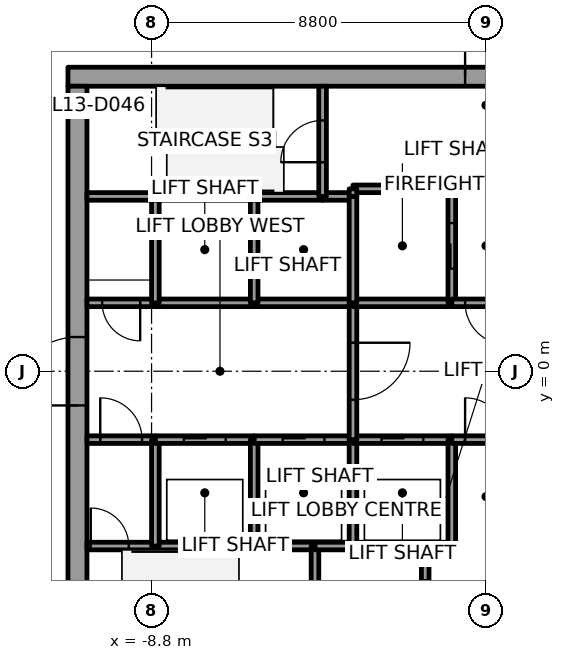
"""IFC4 building model, lengths in metres.
Left out: names, types, materials, properties, quantities, classifications, styles, units other than length and angle.
Written with IfcOpenShell. Run it as: python <this file> out.ifc"""

import sys

from ifc_helpers import new_model, si_unit, direction, frame, frame_2d, origin, place, context, subcontext, project, spatial, rectangle, extrude, element, fill, save


model = new_model("IFC4")
c1 = context("Model", 3, precision=1e-05, world=origin(), true_north=direction((0.0, 1.0)))
c2 = subcontext(c1, "Body", "Model", "MODEL_VIEW")
j1 = project(units=[si_unit("LENGTHUNIT", "METRE"), si_unit("PLANEANGLEUNIT", "RADIAN")], contexts=[c1])
p1 = place(None, origin())
s1 = spatial("IfcSite", under=j1, at=p1, CompositionType="ELEMENT")
p2 = place(p1, origin())
s2 = spatial("IfcBuilding", under=s1, at=p2, CompositionType="ELEMENT")
p3 = place(p2, frame((0.0, 0.0, 70.2)))
s3 = spatial("IfcBuildingStorey", under=s2, at=p3, CompositionType="ELEMENT", Elevation=70.2)
p4 = place(p3, frame((-11.0, 7.75, 0.0), z_axis=(0.0, 0.0, 1.0), x_axis=(1.0, 0.0, 0.0)))
e1 = element("IfcWall", 1, at=p4, inside=s3, PredefinedType="SHEAR", context=c2, shape_type="SweptSolid", body=[
    extrude(rectangle(XDim=22.0, YDim=0.5, at=frame_2d((11.0, 0.0))), origin(), (0.0, 0.0, 1.0), 3.7),
])
p5 = place(p4, frame((10.45, 0.0, 0.0)))
e2 = element("IfcOpeningElement", 2, at=p5, cuts=e1, PredefinedType="OPENING", context=c2, shape_type="SweptSolid", body=[
    extrude(rectangle(XDim=1.1, YDim=2.1, at=frame_2d((0.55, 1.05))), frame((0.0, 0.25, 0.0), z_axis=(0.0, -1.0, 0.0), x_axis=(1.0, 0.0, 0.0)), (0.0, 0.0, 1.0), 0.5),
])
p6 = place(p3, frame((-10.75, -7.5, 0.0), z_axis=(0.0, 0.0, 1.0), x_axis=(0.0, 1.0, 0.0)))
e3 = element("IfcWall", 3, at=p6, inside=s3, PredefinedType="SHEAR", context=c2, shape_type="SweptSolid", body=[
    extrude(rectangle(XDim=15.0, YDim=0.5, at=frame_2d((7.5, 0.0))), origin(), (0.0, 0.0, 1.0), 3.7),
])
p7 = place(p6, frame((6.6, 0.0, 0.0)))
e4 = element("IfcOpeningElement", 4, at=p7, cuts=e3, PredefinedType="OPENING", context=c2, shape_type="SweptSolid", body=[
    extrude(rectangle(XDim=1.8, YDim=2.1, at=frame_2d((0.9, 1.05))), frame((0.0, 0.25, 0.0), z_axis=(0.0, -1.0, 0.0), x_axis=(1.0, 0.0, 0.0)), (0.0, 0.0, 1.0), 0.5),
])
p8 = place(p3, frame((-10.5, -4.6, 0.0), z_axis=(0.0, 0.0, 1.0), x_axis=(1.0, 0.0, 0.0)))
e5 = element("IfcWall", 5, at=p8, inside=s3, PredefinedType="SOLIDWALL", context=c2, shape_type="SweptSolid", body=[
    extrude(rectangle(XDim=1.8, YDim=0.2, at=frame_2d((0.9, 0.0))), origin(), (0.0, 0.0, 1.0), 3.55),
])
p9 = place(p8, frame((0.1, 0.0, 0.0)))
e6 = element("IfcOpeningElement", 6, at=p9, cuts=e5, PredefinedType="OPENING", context=c2, shape_type="SweptSolid", body=[
    extrude(rectangle(XDim=1.0, YDim=2.1, at=frame_2d((0.5, 1.05))), frame((0.0, 0.1, 0.0), z_axis=(0.0, -1.0, 0.0), x_axis=(1.0, 0.0, 0.0)), (0.0, 0.0, 1.0), 0.2),
])
p10 = place(p3, frame((-10.5, -1.8, 0.0), z_axis=(0.0, 0.0, 1.0), x_axis=(1.0, 0.0, 0.0)))
e7 = element("IfcWall", 7, at=p10, inside=s3, PredefinedType="SOLIDWALL", context=c2, shape_type="SweptSolid", body=[
    extrude(rectangle(XDim=1.8, YDim=0.2, at=frame_2d((0.9, 0.0))), origin(), (0.0, 0.0, 1.0), 3.55),
])
p11 = place(p10, frame((0.35, 0.0, 0.0)))
e8 = element("IfcOpeningElement", 8, at=p11, cuts=e7, PredefinedType="OPENING", context=c2, shape_type="SweptSolid", body=[
    extrude(rectangle(XDim=1.1, YDim=2.1, at=frame_2d((0.55, 1.05))), frame((0.0, 0.1, 0.0), z_axis=(0.0, -1.0, 0.0), x_axis=(1.0, 0.0, 0.0)), (0.0, 0.0, 1.0), 0.2),
])
p12 = place(p3, frame((-8.7, 1.8, 0.0), z_axis=(0.0, 0.0, 1.0), x_axis=(-1.0, 0.0, 0.0)))
e9 = element("IfcWall", 9, at=p12, inside=s3, PredefinedType="SOLIDWALL", context=c2, shape_type="SweptSolid", body=[
    extrude(rectangle(XDim=1.8, YDim=0.2, at=frame_2d((0.9, 0.0))), origin(), (0.0, 0.0, 1.0), 3.55),
])
p13 = place(p12, frame((0.4, 0.0, 0.0)))
e10 = element("IfcOpeningElement", 10, at=p13, cuts=e9, PredefinedType="OPENING", context=c2, shape_type="SweptSolid", body=[
    extrude(rectangle(XDim=1.0, YDim=2.1, at=frame_2d((0.5, 1.05))), frame((0.0, 0.1, 0.0), z_axis=(0.0, -1.0, 0.0), x_axis=(1.0, 0.0, 0.0)), (0.0, 0.0, 1.0), 0.2),
])
p14 = place(p3, frame((-8.7, 4.6, 0.0), z_axis=(0.0, 0.0, 1.0), x_axis=(-1.0, 0.0, 0.0)))
e11 = element("IfcWall", 11, at=p14, inside=s3, PredefinedType="SOLIDWALL", context=c2, shape_type="SweptSolid", body=[
    extrude(rectangle(XDim=1.8, YDim=0.2, at=frame_2d((0.9, 0.0))), origin(), (0.0, 0.0, 1.0), 3.55),
])
p15 = place(p3, frame((-8.7, -4.6, 0.0), z_axis=(0.0, 0.0, 1.0), x_axis=(1.0, 0.0, 0.0)))
e12 = element("IfcWall", 12, at=p15, inside=s3, PredefinedType="SOLIDWALL", context=c2, shape_type="SweptSolid", body=[
    extrude(rectangle(XDim=2.6, YDim=0.2, at=frame_2d((1.3, 0.0))), origin(), (0.0, 0.0, 1.0), 3.55),
])
p16 = place(p3, frame((-8.7, -4.6, 0.0), z_axis=(0.0, 0.0, 1.0), x_axis=(0.0, 1.0, 0.0)))
e13 = element("IfcWall", 13, at=p16, inside=s3, PredefinedType="SOLIDWALL", context=c2, shape_type="SweptSolid", body=[
    extrude(rectangle(XDim=2.8, YDim=0.2, at=frame_2d((1.4, 0.0))), origin(), (0.0, 0.0, 1.0), 3.55),
])
p17 = place(p3, frame((-8.7, -1.8, 0.0), z_axis=(0.0, 0.0, 1.0), x_axis=(1.0, 0.0, 0.0)))
e14 = element("IfcWall", 14, at=p17, inside=s3, PredefinedType="SOLIDWALL", context=c2, shape_type="SweptSolid", body=[
    extrude(rectangle(XDim=2.6, YDim=0.2, at=frame_2d((1.3, 0.0))), origin(), (0.0, 0.0, 1.0), 3.55),
])
p18 = place(p17, frame((0.75, 0.0, 0.0)))
e15 = element("IfcOpeningElement", 15, at=p18, cuts=e14, PredefinedType="OPENING", context=c2, shape_type="SweptSolid", body=[
    extrude(rectangle(XDim=1.1, YDim=2.1, at=frame_2d((0.55, 1.05))), frame((0.0, 0.1, 0.0), z_axis=(0.0, -1.0, 0.0), x_axis=(1.0, 0.0, 0.0)), (0.0, 0.0, 1.0), 0.2),
])
p19 = place(p3, frame((-6.1, 1.8, 0.0), z_axis=(0.0, 0.0, 1.0), x_axis=(-1.0, 0.0, 0.0)))
e16 = element("IfcWall", 16, at=p19, inside=s3, PredefinedType="SOLIDWALL", context=c2, shape_type="SweptSolid", body=[
    extrude(rectangle(XDim=2.6, YDim=0.2, at=frame_2d((1.3, 0.0))), origin(), (0.0, 0.0, 1.0), 3.55),
])
p20 = place(p3, frame((-8.7, 1.8, 0.0), z_axis=(0.0, 0.0, 1.0), x_axis=(0.0, 1.0, 0.0)))
e17 = element("IfcWall", 17, at=p20, inside=s3, PredefinedType="SOLIDWALL", context=c2, shape_type="SweptSolid", body=[
    extrude(rectangle(XDim=2.8, YDim=0.2, at=frame_2d((1.4, 0.0))), origin(), (0.0, 0.0, 1.0), 3.55),
])
p21 = place(p3, frame((-6.1, 4.6, 0.0), z_axis=(0.0, 0.0, 1.0), x_axis=(-1.0, 0.0, 0.0)))
e18 = element("IfcWall", 18, at=p21, inside=s3, PredefinedType="SOLIDWALL", context=c2, shape_type="SweptSolid", body=[
    extrude(rectangle(XDim=2.6, YDim=0.2, at=frame_2d((1.3, 0.0))), origin(), (0.0, 0.0, 1.0), 3.55),
])
p22 = place(p3, frame((-6.1, -4.6, 0.0), z_axis=(0.0, 0.0, 1.0), x_axis=(1.0, 0.0, 0.0)))
e19 = element("IfcWall", 19, at=p22, inside=s3, PredefinedType="SOLIDWALL", context=c2, shape_type="SweptSolid", body=[
    extrude(rectangle(XDim=1.6, YDim=0.2, at=frame_2d((0.8, 0.0))), origin(), (0.0, 0.0, 1.0), 3.55),
])
p23 = place(p3, frame((-6.1, -4.6, 0.0), z_axis=(0.0, 0.0, 1.0), x_axis=(0.0, 1.0, 0.0)))
e20 = element("IfcWall", 20, at=p23, inside=s3, PredefinedType="SOLIDWALL", context=c2, shape_type="SweptSolid", body=[
    extrude(rectangle(XDim=2.8, YDim=0.2, at=frame_2d((1.4, 0.0))), origin(), (0.0, 0.0, 1.0), 3.55),
])
p24 = place(p3, frame((-6.1, -1.8, 0.0), z_axis=(0.0, 0.0, 1.0), x_axis=(1.0, 0.0, 0.0)))
e21 = element("IfcWall", 21, at=p24, inside=s3, PredefinedType="SOLIDWALL", context=c2, shape_type="SweptSolid", body=[
    extrude(rectangle(XDim=2.6, YDim=0.2, at=frame_2d((1.3, 0.0))), origin(), (0.0, 0.0, 1.0), 3.55),
])
p25 = place(p24, frame((0.75, 0.0, 0.0)))
e22 = element("IfcOpeningElement", 22, at=p25, cuts=e21, PredefinedType="OPENING", context=c2, shape_type="SweptSolid", body=[
    extrude(rectangle(XDim=1.1, YDim=2.1, at=frame_2d((0.55, 1.05))), frame((0.0, 0.1, 0.0), z_axis=(0.0, -1.0, 0.0), x_axis=(1.0, 0.0, 0.0)), (0.0, 0.0, 1.0), 0.2),
])
p26 = place(p3, frame((-3.5, 1.8, 0.0), z_axis=(0.0, 0.0, 1.0), x_axis=(-1.0, 0.0, 0.0)))
e23 = element("IfcWall", 23, at=p26, inside=s3, PredefinedType="SOLIDWALL", context=c2, shape_type="SweptSolid", body=[
    extrude(rectangle(XDim=2.6, YDim=0.2, at=frame_2d((1.3, 0.0))), origin(), (0.0, 0.0, 1.0), 3.55),
])
p27 = place(p3, frame((-6.1, 1.8, 0.0), z_axis=(0.0, 0.0, 1.0), x_axis=(0.0, 1.0, 0.0)))
e24 = element("IfcWall", 24, at=p27, inside=s3, PredefinedType="SOLIDWALL", context=c2, shape_type="SweptSolid", body=[
    extrude(rectangle(XDim=2.8, YDim=0.2, at=frame_2d((1.4, 0.0))), origin(), (0.0, 0.0, 1.0), 3.55),
])
p28 = place(p3, frame((-4.3, 4.6, 0.0), z_axis=(0.0, 0.0, 1.0), x_axis=(-1.0, 0.0, 0.0)))
e25 = element("IfcWall", 25, at=p28, inside=s3, PredefinedType="SOLIDWALL", context=c2, shape_type="SweptSolid", body=[
    extrude(rectangle(XDim=1.8, YDim=0.2, at=frame_2d((0.9, 0.0))), origin(), (0.0, 0.0, 1.0), 3.55),
])
p29 = place(p3, frame((-4.5, -4.6, 0.0), z_axis=(0.0, 0.0, 1.0), x_axis=(0.0, -1.0, 0.0)))
e26 = element("IfcWall", 26, at=p29, inside=s3, PredefinedType="SOLIDWALL", context=c2, shape_type="SweptSolid", body=[
    extrude(rectangle(XDim=2.9, YDim=0.2, at=frame_2d((1.45, 0.0))), origin(), (0.0, 0.0, 1.0), 3.55),
])
p30 = place(p3, frame((-4.5, -4.6, 0.0), z_axis=(0.0, 0.0, 1.0), x_axis=(1.0, 0.0, 0.0)))
e27 = element("IfcWall", 27, at=p30, inside=s3, PredefinedType="SOLIDWALL", context=c2, shape_type="SweptSolid", body=[
    extrude(rectangle(XDim=1.0, YDim=0.2, at=frame_2d((0.5, 0.0))), origin(), (0.0, 0.0, 1.0), 3.55),
])
p31 = place(p3, frame((-3.5, 4.6, 0.0), z_axis=(0.0, 0.0, 1.0), x_axis=(-1.0, 0.0, 0.0)))
e28 = element("IfcWall", 28, at=p31, inside=s3, PredefinedType="SOLIDWALL", context=c2, shape_type="SweptSolid", body=[
    extrude(rectangle(XDim=0.8, YDim=0.2, at=frame_2d((0.4, 0.0))), origin(), (0.0, 0.0, 1.0), 3.55),
])
p32 = place(p3, frame((-4.3, 4.6, 0.0), z_axis=(0.0, 0.0, 1.0), x_axis=(0.0, 1.0, 0.0)))
e29 = element("IfcWall", 29, at=p32, inside=s3, PredefinedType="SOLIDWALL", context=c2, shape_type="SweptSolid", body=[
    extrude(rectangle(XDim=2.9, YDim=0.2, at=frame_2d((1.45, 0.0))), origin(), (0.0, 0.0, 1.0), 3.55),
])
p33 = place(p32, frame((0.9, 0.0, 0.0)))
e30 = element("IfcOpeningElement", 30, at=p33, cuts=e29, PredefinedType="OPENING", context=c2, shape_type="SweptSolid", body=[
    extrude(rectangle(XDim=1.1, YDim=2.1, at=frame_2d((0.55, 1.05))), frame((0.0, 0.1, 0.0), z_axis=(0.0, -1.0, 0.0), x_axis=(1.0, 0.0, 0.0)), (0.0, 0.0, 1.0), 0.2),
])
p34 = place(p3, frame((-3.5, -4.6, 0.0), z_axis=(0.0, 0.0, 1.0), x_axis=(1.0, 0.0, 0.0)))
e31 = element("IfcWall", 31, at=p34, inside=s3, PredefinedType="SOLIDWALL", context=c2, shape_type="SweptSolid", body=[
    extrude(rectangle(XDim=1.9, YDim=0.2, at=frame_2d((0.95, 0.0))), origin(), (0.0, 0.0, 1.0), 3.55),
])
p35 = place(p3, frame((-3.5, -4.6, 0.0), z_axis=(0.0, 0.0, 1.0), x_axis=(0.0, 1.0, 0.0)))
e32 = element("IfcWall", 32, at=p35, inside=s3, PredefinedType="SOLIDWALL", context=c2, shape_type="SweptSolid", body=[
    extrude(rectangle(XDim=2.8, YDim=0.2, at=frame_2d((1.4, 0.0))), origin(), (0.0, 0.0, 1.0), 3.55),
])
p36 = place(p3, frame((-3.5, -1.8, 0.0), z_axis=(0.0, 0.0, 1.0), x_axis=(1.0, 0.0, 0.0)))
e33 = element("IfcWall", 33, at=p36, inside=s3, PredefinedType="SOLIDWALL", context=c2, shape_type="SweptSolid", body=[
    extrude(rectangle(XDim=2.6, YDim=0.2, at=frame_2d((1.3, 0.0))), origin(), (0.0, 0.0, 1.0), 3.55),
])
p37 = place(p36, frame((0.75, 0.0, 0.0)))
e34 = element("IfcOpeningElement", 34, at=p37, cuts=e33, PredefinedType="OPENING", context=c2, shape_type="SweptSolid", body=[
    extrude(rectangle(XDim=1.1, YDim=2.1, at=frame_2d((0.55, 1.05))), frame((0.0, 0.1, 0.0), z_axis=(0.0, -1.0, 0.0), x_axis=(1.0, 0.0, 0.0)), (0.0, 0.0, 1.0), 0.2),
])
p38 = place(p3, frame((-3.5, 1.8, 0.0), z_axis=(0.0, 0.0, 1.0), x_axis=(0.0, -1.0, 0.0)))
e35 = element("IfcWall", 35, at=p38, inside=s3, PredefinedType="SOLIDWALL", context=c2, shape_type="SweptSolid", body=[
    extrude(rectangle(XDim=3.6, YDim=0.2, at=frame_2d((1.8, 0.0))), origin(), (0.0, 0.0, 1.0), 3.55),
])
p39 = place(p38, frame((1.05, 0.0, 0.0)))
e36 = element("IfcOpeningElement", 36, at=p39, cuts=e35, PredefinedType="OPENING", context=c2, shape_type="SweptSolid", body=[
    extrude(rectangle(XDim=1.5, YDim=2.1, at=frame_2d((0.75, 1.05))), frame((0.0, 0.1, 0.0), z_axis=(0.0, -1.0, 0.0), x_axis=(1.0, 0.0, 0.0)), (0.0, 0.0, 1.0), 0.2),
])
p40 = place(p3, frame((-0.9, 1.8, 0.0), z_axis=(0.0, 0.0, 1.0), x_axis=(-1.0, 0.0, 0.0)))
e37 = element("IfcWall", 37, at=p40, inside=s3, PredefinedType="SOLIDWALL", context=c2, shape_type="SweptSolid", body=[
    extrude(rectangle(XDim=2.6, YDim=0.2, at=frame_2d((1.3, 0.0))), origin(), (0.0, 0.0, 1.0), 3.55),
])
p41 = place(p3, frame((-3.5, 4.6, 0.0), z_axis=(0.0, 0.0, 1.0), x_axis=(0.0, -1.0, 0.0)))
e38 = element("IfcWall", 38, at=p41, inside=s3, PredefinedType="SOLIDWALL", context=c2, shape_type="SweptSolid", body=[
    extrude(rectangle(XDim=2.8, YDim=0.2, at=frame_2d((1.4, 0.0))), origin(), (0.0, 0.0, 1.0), 3.55),
])
p42 = place(p3, frame((-0.9, 1.8, 0.0), z_axis=(0.0, 0.0, 1.0), x_axis=(0.0, 1.0, 0.0)))
e39 = element("IfcWall", 39, at=p42, inside=s3, PredefinedType="SOLIDWALL", context=c2, shape_type="SweptSolid", body=[
    extrude(rectangle(XDim=3.0, YDim=0.2, at=frame_2d((1.5, 0.0))), origin(), (0.0, 0.0, 1.0), 3.55),
])
p43 = place(p42, frame((0.9, 0.0, 0.0)))
e40 = element("IfcOpeningElement", 40, at=p43, cuts=e39, PredefinedType="OPENING", context=c2, shape_type="SweptSolid", body=[
    extrude(rectangle(XDim=1.2, YDim=2.1, at=frame_2d((0.6, 1.05))), frame((0.0, 0.1, 0.0), z_axis=(0.0, -1.0, 0.0), x_axis=(1.0, 0.0, 0.0)), (0.0, 0.0, 1.0), 0.2),
])
p44 = place(p3, frame((-0.9, 4.8, 0.0), z_axis=(0.0, 0.0, 1.0), x_axis=(-1.0, 0.0, 0.0)))
e41 = element("IfcWall", 41, at=p44, inside=s3, PredefinedType="SOLIDWALL", context=c2, shape_type="SweptSolid", body=[
    extrude(rectangle(XDim=2.6, YDim=0.2, at=frame_2d((1.3, 0.0))), origin(), (0.0, 0.0, 1.0), 3.55),
])
p45 = place(p3, frame((-3.5, 4.8, 0.0), z_axis=(0.0, 0.0, 1.0), x_axis=(0.0, -1.0, 0.0)))
e42 = element("IfcWall", 42, at=p45, inside=s3, PredefinedType="SOLIDWALL", context=c2, shape_type="SweptSolid", body=[
    extrude(rectangle(XDim=0.2, YDim=0.2, at=frame_2d((0.1, 0.0))), origin(), (0.0, 0.0, 1.0), 3.55),
])
p46 = place(p3, frame((-1.6, -7.5, 0.0), z_axis=(0.0, 0.0, 1.0), x_axis=(0.0, 1.0, 0.0)))
e43 = element("IfcWall", 43, at=p46, inside=s3, PredefinedType="SOLIDWALL", context=c2, shape_type="SweptSolid", body=[
    extrude(rectangle(XDim=2.9, YDim=0.2, at=frame_2d((1.45, 0.0))), origin(), (0.0, 0.0, 1.0), 3.55),
])
p47 = place(p46, frame((0.9, 0.0, 0.0)))
e44 = element("IfcOpeningElement", 44, at=p47, cuts=e43, PredefinedType="OPENING", context=c2, shape_type="SweptSolid", body=[
    extrude(rectangle(XDim=1.1, YDim=2.1, at=frame_2d((0.55, 1.05))), frame((0.0, 0.1, 0.0), z_axis=(0.0, -1.0, 0.0), x_axis=(1.0, 0.0, 0.0)), (0.0, 0.0, 1.0), 0.2),
])
p48 = place(p3, frame((-1.6, -4.6, 0.0), z_axis=(0.0, 0.0, 1.0), x_axis=(1.0, 0.0, 0.0)))
e45 = element("IfcWall", 45, at=p48, inside=s3, PredefinedType="SOLIDWALL", context=c2, shape_type="SweptSolid", body=[
    extrude(rectangle(XDim=0.7, YDim=0.2, at=frame_2d((0.35, 0.0))), origin(), (0.0, 0.0, 1.0), 3.55),
])
p49 = place(p3, frame((-0.9, -4.6, 0.0), z_axis=(0.0, 0.0, 1.0), x_axis=(0.0, 1.0, 0.0)))
e46 = element("IfcWall", 46, at=p49, inside=s3, PredefinedType="SOLIDWALL", context=c2, shape_type="SweptSolid", body=[
    extrude(rectangle(XDim=2.8, YDim=0.2, at=frame_2d((1.4, 0.0))), origin(), (0.0, 0.0, 1.0), 3.55),
])
p50 = place(p3, frame((-0.9, -1.8, 0.0), z_axis=(0.0, 0.0, 1.0), x_axis=(1.0, 0.0, 0.0)))
e47 = element("IfcWall", 47, at=p50, inside=s3, PredefinedType="SOLIDWALL", context=c2, shape_type="SweptSolid", body=[
    extrude(rectangle(XDim=1.8, YDim=0.2, at=frame_2d((0.9, 0.0))), origin(), (0.0, 0.0, 1.0), 3.55),
])
p51 = place(p50, frame((0.35, 0.0, 0.0)))
e48 = element("IfcOpeningElement", 48, at=p51, cuts=e47, PredefinedType="OPENING", context=c2, shape_type="SweptSolid", body=[
    extrude(rectangle(XDim=1.1, YDim=2.1, at=frame_2d((0.55, 1.05))), frame((0.0, 0.1, 0.0), z_axis=(0.0, -1.0, 0.0), x_axis=(1.0, 0.0, 0.0)), (0.0, 0.0, 1.0), 0.2),
])
p52 = place(p3, frame((0.9, 1.8, 0.0), z_axis=(0.0, 0.0, 1.0), x_axis=(-1.0, 0.0, 0.0)))
e49 = element("IfcWall", 49, at=p52, inside=s3, PredefinedType="SOLIDWALL", context=c2, shape_type="SweptSolid", body=[
    extrude(rectangle(XDim=1.8, YDim=0.2, at=frame_2d((0.9, 0.0))), origin(), (0.0, 0.0, 1.0), 3.55),
])
p53 = place(p52, frame((0.35, 0.0, 0.0)))
e50 = element("IfcOpeningElement", 50, at=p53, cuts=e49, PredefinedType="OPENING", context=c2, shape_type="SweptSolid", body=[
    extrude(rectangle(XDim=1.1, YDim=2.1, at=frame_2d((0.55, 1.05))), frame((0.0, 0.1, 0.0), z_axis=(0.0, -1.0, 0.0), x_axis=(1.0, 0.0, 0.0)), (0.0, 0.0, 1.0), 0.2),
])
p54 = place(p18, origin())
e51 = element("IfcDoor", 51, at=p54, inside=s3, OperationType="SLIDING_TO_RIGHT", PredefinedType="DOOR", context=c2, shape_type="SweptSolid", body=[
    extrude(rectangle(XDim=1.1, YDim=2.1, at=frame_2d((0.55, 1.05))), frame((0.0, 0.025, 0.0), z_axis=(0.0, -1.0, 0.0), x_axis=(1.0, 0.0, 0.0)), (0.0, 0.0, 1.0), 0.05),
])
fill(e15, e51)
p55 = place(p25, origin())
e52 = element("IfcDoor", 52, at=p55, inside=s3, OperationType="SLIDING_TO_RIGHT", PredefinedType="DOOR", context=c2, shape_type="SweptSolid", body=[
    extrude(rectangle(XDim=1.1, YDim=2.1, at=frame_2d((0.55, 1.05))), frame((0.0, 0.025, 0.0), z_axis=(0.0, -1.0, 0.0), x_axis=(1.0, 0.0, 0.0)), (0.0, 0.0, 1.0), 0.05),
])
fill(e22, e52)
p56 = place(p37, origin())
e53 = element("IfcDoor", 53, at=p56, inside=s3, OperationType="SLIDING_TO_RIGHT", PredefinedType="DOOR", context=c2, shape_type="SweptSolid", body=[
    extrude(rectangle(XDim=1.1, YDim=2.1, at=frame_2d((0.55, 1.05))), frame((0.0, 0.025, 0.0), z_axis=(0.0, -1.0, 0.0), x_axis=(1.0, 0.0, 0.0)), (0.0, 0.0, 1.0), 0.05),
])
fill(e34, e53)
p57 = place(p43, origin())
e54 = element("IfcDoor", 54, at=p57, inside=s3, OperationType="SLIDING_TO_LEFT", PredefinedType="DOOR", context=c2, shape_type="SweptSolid", body=[
    extrude(rectangle(XDim=1.2, YDim=2.1, at=frame_2d((0.6, 1.05))), frame((0.0, 0.025, 0.0), z_axis=(0.0, -1.0, 0.0), x_axis=(1.0, 0.0, 0.0)), (0.0, 0.0, 1.0), 0.05),
])
fill(e40, e54)
p58 = place(p39, origin())
e55 = element("IfcDoor", 55, at=p58, inside=s3, OperationType="DOUBLE_DOOR_SINGLE_SWING", PredefinedType="DOOR", context=c2, shape_type="SweptSolid", body=[
    extrude(rectangle(XDim=1.5, YDim=2.1, at=frame_2d((0.75, 1.05))), frame((0.0, 0.025, 0.0), z_axis=(0.0, -1.0, 0.0), x_axis=(1.0, 0.0, 0.0)), (0.0, 0.0, 1.0), 0.05),
])
fill(e36, e55)
p59 = place(p11, origin())
e56 = element("IfcDoor", 56, at=p59, inside=s3, OperationType="SINGLE_SWING_LEFT", PredefinedType="DOOR", context=c2, shape_type="SweptSolid", body=[
    extrude(rectangle(XDim=1.1, YDim=2.1, at=frame_2d((0.55, 1.05))), frame((0.0, 0.025, 0.0), z_axis=(0.0, -1.0, 0.0), x_axis=(1.0, 0.0, 0.0)), (0.0, 0.0, 1.0), 0.05),
])
fill(e8, e56)
p60 = place(p53, origin())
e57 = element("IfcDoor", 57, at=p60, inside=s3, OperationType="SINGLE_SWING_RIGHT", PredefinedType="DOOR", context=c2, shape_type="SweptSolid", body=[
    extrude(rectangle(XDim=1.1, YDim=2.1, at=frame_2d((0.55, 1.05))), frame((0.0, 0.025, 0.0), z_axis=(0.0, -1.0, 0.0), x_axis=(1.0, 0.0, 0.0)), (0.0, 0.0, 1.0), 0.05),
])
fill(e50, e57)
p61 = place(p51, origin())
e58 = element("IfcDoor", 58, at=p61, inside=s3, OperationType="SINGLE_SWING_LEFT", PredefinedType="DOOR", context=c2, shape_type="SweptSolid", body=[
    extrude(rectangle(XDim=1.1, YDim=2.1, at=frame_2d((0.55, 1.05))), frame((0.0, 0.025, 0.0), z_axis=(0.0, -1.0, 0.0), x_axis=(1.0, 0.0, 0.0)), (0.0, 0.0, 1.0), 0.05),
])
fill(e48, e58)
p62 = place(p13, origin())
e59 = element("IfcDoor", 59, at=p62, inside=s3, OperationType="SINGLE_SWING_LEFT", PredefinedType="DOOR", context=c2, shape_type="SweptSolid", body=[
    extrude(rectangle(XDim=1.0, YDim=2.1, at=frame_2d((0.5, 1.05))), frame((0.0, 0.025, 0.0), z_axis=(0.0, -1.0, 0.0), x_axis=(1.0, 0.0, 0.0)), (0.0, 0.0, 1.0), 0.05),
])
fill(e10, e59)
p63 = place(p9, origin())
e60 = element("IfcDoor", 60, at=p63, inside=s3, OperationType="SINGLE_SWING_LEFT", PredefinedType="DOOR", context=c2, shape_type="SweptSolid", body=[
    extrude(rectangle(XDim=1.0, YDim=2.1, at=frame_2d((0.5, 1.05))), frame((0.0, 0.025, 0.0), z_axis=(0.0, -1.0, 0.0), x_axis=(1.0, 0.0, 0.0)), (0.0, 0.0, 1.0), 0.05),
])
fill(e6, e60)
p64 = place(p33, origin())
e61 = element("IfcDoor", 61, at=p64, inside=s3, OperationType="SINGLE_SWING_LEFT", PredefinedType="DOOR", context=c2, shape_type="SweptSolid", body=[
    extrude(rectangle(XDim=1.1, YDim=2.1, at=frame_2d((0.55, 1.05))), frame((0.0, 0.025, 0.0), z_axis=(0.0, -1.0, 0.0), x_axis=(1.0, 0.0, 0.0)), (0.0, 0.0, 1.0), 0.05),
])
fill(e30, e61)
p65 = place(p7, origin())
e62 = element("IfcDoor", 62, at=p65, inside=s3, OperationType="DOUBLE_DOOR_SINGLE_SWING", PredefinedType="DOOR", context=c2, shape_type="SweptSolid", body=[
    extrude(rectangle(XDim=1.8, YDim=2.1, at=frame_2d((0.9, 1.05))), frame((0.0, 0.025, 0.0), z_axis=(0.0, -1.0, 0.0), x_axis=(1.0, 0.0, 0.0)), (0.0, 0.0, 1.0), 0.05),
])
fill(e4, e62)
p66 = place(p5, origin())
e63 = element("IfcDoor", 63, at=p66, inside=s3, OperationType="SINGLE_SWING_RIGHT", PredefinedType="DOOR", context=c2, shape_type="SweptSolid", body=[
    extrude(rectangle(XDim=1.1, YDim=2.1, at=frame_2d((0.55, 1.05))), frame((0.0, 0.025, 0.0), z_axis=(0.0, -1.0, 0.0), x_axis=(1.0, 0.0, 0.0)), (0.0, 0.0, 1.0), 0.05),
])
fill(e2, e63)
save(model, sys.argv[1])
